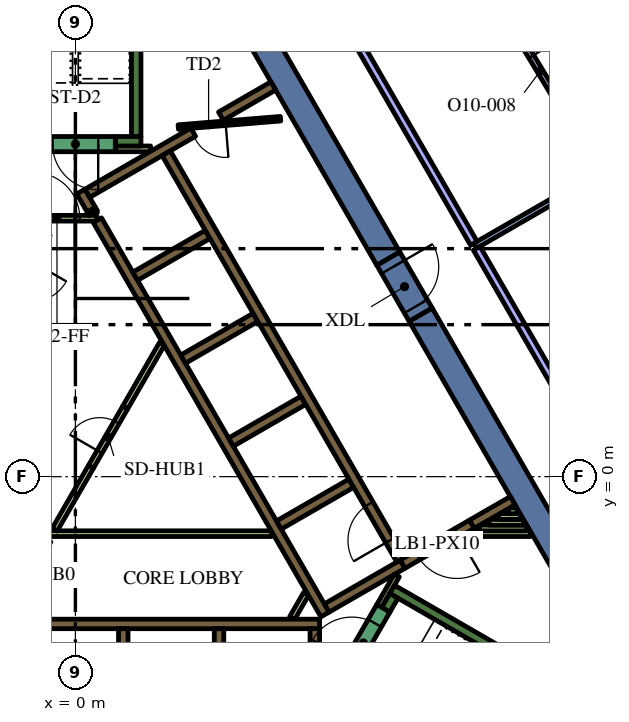
"""IFC4 building model, lengths in metres.
Left out: names, types, materials, properties, quantities, classifications, styles, units other than length and angle.
Written with IfcOpenShell. Run it as: python <this file> out.ifc"""

import sys

from ifc_helpers import new_model, si_unit, direction, frame, frame_2d, origin, place, context, subcontext, project, spatial, rectangle, extrude, element, fill, save


model = new_model("IFC4")
c1 = context("Model", 3, precision=1e-05, world=origin(), true_north=direction((0.0, 1.0)))
c2 = subcontext(c1, "Body", "Model", "MODEL_VIEW")
j1 = project(units=[si_unit("LENGTHUNIT", "METRE"), si_unit("PLANEANGLEUNIT", "RADIAN")], contexts=[c1])
p1 = place(None, origin())
s1 = spatial("IfcSite", under=j1, at=p1, CompositionType="ELEMENT")
p2 = place(p1, origin())
s2 = spatial("IfcBuilding", under=s1, at=p2, CompositionType="ELEMENT")
p3 = place(p2, frame((0.0, 0.0, 252.0)))
s3 = spatial("IfcBuildingStorey", under=s2, at=p3, CompositionType="ELEMENT", Elevation=252.0)
for number, where, z_axis, x_axis in (
    (1, (9.085, 4.264, 0.0), (0.0, 0.0, 1.0), (0.5, -0.866, 0.0)),
    (2, (8.235, 5.736, 0.0), (0.0, 0.0, 1.0), (-0.5, 0.866, 0.0)),
):
    element("IfcWall", number, at=place(p3, frame(where, z_axis=z_axis, x_axis=x_axis)), inside=s3, PredefinedType="SOLIDWALL", context=c2, shape_type="SweptSolid", body=[
        extrude(rectangle(XDim=12.472, YDim=0.7, at=frame_2d((6.236, 0.0))), origin(), (0.0, 0.0, 1.0), 4.2),
    ])
p4 = place(p3, frame((8.334, -2.964, 0.0), z_axis=(0.0, 0.0, 1.0), x_axis=(0.866016039709, -0.500016218704, 0.0)))
e3 = element("IfcWall", 3, at=p4, inside=s3, PredefinedType="SOLIDWALL", context=c2, shape_type="SweptSolid", body=[
    extrude(rectangle(XDim=7.05, YDim=0.25, at=frame_2d((3.525, 0.0))), origin(), (0.0, 0.0, 1.0), 4.2),
])
p5 = place(p3, frame((8.168, -3.503, 0.0), z_axis=(0.0, 0.0, 1.0), x_axis=(0.49972245349, 0.866185586049, 0.0)))
e4 = element("IfcWall", 4, at=p5, inside=s3, PredefinedType="SOLIDWALL", context=c2, shape_type="SweptSolid", body=[
    extrude(rectangle(XDim=0.425, YDim=0.25, at=frame_2d((0.212, 0.0))), origin(), (0.0, 0.0, 1.0), 4.2),
])
p6 = place(p3, frame((1.6, 8.95, 0.0), z_axis=(0.0, 0.0, 1.0), x_axis=(0.0, 1.0, 0.0)))
e5 = element("IfcWall", 5, at=p6, inside=s3, PredefinedType="SOLIDWALL", context=c2, shape_type="SweptSolid", body=[
    extrude(rectangle(XDim=6.8, YDim=0.25, at=frame_2d((3.4, 0.0))), origin(), (0.0, 0.0, 1.0), 4.2),
])
p7 = place(p3, frame((1.05, 8.825, 0.0), z_axis=(0.0, 0.0, 1.0), x_axis=(1.0, 0.0, 0.0)))
e6 = element("IfcWall", 6, at=p7, inside=s3, PredefinedType="SOLIDWALL", context=c2, shape_type="SweptSolid", body=[
    extrude(rectangle(XDim=0.675, YDim=0.25, at=frame_2d((0.337, 0.0))), origin(), (0.0, 0.0, 1.0), 4.2),
])
p8 = place(p3, frame((-5.545, -3.875, 0.0), z_axis=(0.0, 0.0, 1.0), x_axis=(1.0, 0.0, 0.0)))
e7 = element("IfcWall", 7, at=p8, inside=s3, PredefinedType="SOLIDWALL", context=c2, shape_type="SweptSolid", body=[
    extrude(rectangle(XDim=11.97, YDim=0.25, at=frame_2d((5.985, 0.0))), origin(), (0.0, 0.0, 1.0), 4.2),
])
p9 = place(p3, frame((6.3, -7.24, 0.0), z_axis=(0.0, 0.0, 1.0), x_axis=(0.0, 1.0, 0.0)))
e8 = element("IfcWall", 8, at=p9, inside=s3, PredefinedType="SOLIDWALL", context=c2, shape_type="SweptSolid", body=[
    extrude(rectangle(XDim=3.24, YDim=0.25, at=frame_2d((1.62, 0.0))), origin(), (0.0, 0.0, 1.0), 4.2),
])
for number, where, z_axis, x_axis in (
    (9, (3.78, -4.0, 0.0), (0.0, 0.0, 1.0), (0.0, -1.0, 0.0)),
    (10, (1.26, -4.0, 0.0), (0.0, 0.0, 1.0), (0.0, -1.0, 0.0)),
):
    element("IfcWall", number, at=place(p3, frame(where, z_axis=z_axis, x_axis=x_axis)), inside=s3, PredefinedType="SOLIDWALL", context=c2, shape_type="SweptSolid", body=[
        extrude(rectangle(XDim=2.2, YDim=0.25, at=frame_2d((1.1, 0.0))), origin(), (0.0, 0.0, 1.0), 4.2),
    ])
p10 = place(p3, frame((11.507, -0.631, 0.0), z_axis=(0.0, 0.0, 1.0), x_axis=(-0.866025525965, -0.499999788377, 0.0)))
e11 = element("IfcWall", 11, at=p10, inside=s3, PredefinedType="SOLIDWALL", context=c2, shape_type="SweptSolid", body=[
    extrude(rectangle(XDim=1.245, YDim=0.25, at=frame_2d((0.622, 0.0))), origin(), (0.0, 0.0, 1.0), 4.2),
])
p11 = place(p3, frame((0.473, 6.93, 0.0), z_axis=(0.0, 0.0, 1.0), x_axis=(-0.49972245349, 0.866185586049, 0.0)))
e12 = element("IfcWall", 12, at=p11, inside=s3, PredefinedType="SOLIDWALL", context=c2, shape_type="SweptSolid", body=[
    extrude(rectangle(XDim=0.11, YDim=0.25, at=frame_2d((0.055, 0.0))), origin(), (0.0, 0.0, 1.0), 4.2),
])
p12 = place(p3, frame((6.568, -3.627, 0.0), z_axis=(0.0, 0.0, 1.0), x_axis=(-0.499999455981, 0.866025717874, 0.0)))
e13 = element("IfcWall", 13, at=p12, inside=s3, PredefinedType="SOLIDWALL", context=c2, shape_type="SweptSolid", body=[
    extrude(rectangle(XDim=11.978, YDim=0.25, at=frame_2d((5.989, 0.0))), origin(), (0.0, 0.0, 1.0), 4.2),
])
p13 = place(p3, frame((0.417, 7.027, 0.0), z_axis=(0.0, 0.0, 1.0), x_axis=(-0.500210807569, 0.865903659763, 0.0)))
e14 = element("IfcWall", 14, at=p13, inside=s3, PredefinedType="SOLIDWALL", context=c2, shape_type="SweptSolid", body=[
    extrude(rectangle(XDim=0.548, YDim=0.25, at=frame_2d((0.274, 0.0))), origin(), (0.0, 0.0, 1.0), 4.2),
])
p14 = place(p3, frame((3.1, 9.064, 0.0), z_axis=(0.0, 0.0, 1.0), x_axis=(-0.866030133475, -0.499991807846, 0.0)))
e15 = element("IfcWall", 15, at=p14, inside=s3, PredefinedType="SOLIDWALL", context=c2, shape_type="SweptSolid", body=[
    extrude(rectangle(XDim=3.217, YDim=0.25, at=frame_2d((1.608, 0.0))), origin(), (0.0, 0.0, 1.0), 4.2),
])
p15 = place(p3, frame((1.574, 5.274, 0.0), z_axis=(0.0, 0.0, 1.0), x_axis=(0.866028486751, 0.499994660107, 0.0)))
e16 = element("IfcWall", 16, at=p15, inside=s3, PredefinedType="SOLIDWALL", context=c2, shape_type="SweptSolid", body=[
    extrude(rectangle(XDim=2.2, YDim=0.25, at=frame_2d((1.1, 0.0))), origin(), (0.0, 0.0, 1.0), 4.2),
])
for number, where, z_axis, x_axis in (
    (17, (2.834, 3.091, 0.0), (0.0, 0.0, 1.0), (0.866, 0.5, 0.0)),
    (18, (4.094, 0.909, 0.0), (0.0, 0.0, 1.0), (0.866, 0.5, 0.0)),
    (19, (5.354, -1.274, 0.0), (0.0, 0.0, 1.0), (0.866, 0.5, 0.0)),
):
    element("IfcWall", number, at=place(p3, frame(where, z_axis=z_axis, x_axis=x_axis)), inside=s3, PredefinedType="SOLIDWALL", context=c2, shape_type="SweptSolid", body=[
        extrude(rectangle(XDim=2.2, YDim=0.25, at=frame_2d((1.1, 0.0))), origin(), (0.0, 0.0, 1.0), 4.2),
    ])
p16 = place(p3, frame((6.614, -3.456, 0.0), z_axis=(0.0, 0.0, 1.0), x_axis=(0.866025089694, 0.500000544019, 0.0)))
e20 = element("IfcWall", 20, at=p16, inside=s3, PredefinedType="SOLIDWALL", context=c2, shape_type="SweptSolid", body=[
    extrude(rectangle(XDim=2.305, YDim=0.25, at=frame_2d((1.153, 0.0))), origin(), (0.0, 0.0, 1.0), 4.2),
])
p17 = place(p3, frame((3.83, 9.486, 0.0), z_axis=(0.0, 0.0, 1.0), x_axis=(0.865986202621, 0.500067892261, 0.0)))
e21 = element("IfcWall", 21, at=p17, inside=s3, PredefinedType="SOLIDWALL", context=c2, shape_type="SweptSolid", body=[
    extrude(rectangle(XDim=1.591, YDim=0.25, at=frame_2d((0.795, 0.0))), origin(), (0.0, 0.0, 1.0), 4.2),
])
p18 = place(p3, frame((1.05, 8.625, 0.0), z_axis=(0.0, 0.0, 1.0), x_axis=(1.0, 0.0, 0.0)))
e22 = element("IfcWall", 22, at=p18, inside=s3, PredefinedType="PARTITIONING", context=c2, shape_type="SweptSolid", body=[
    extrude(rectangle(XDim=0.929, YDim=0.15, at=frame_2d((0.464, 0.0))), origin(), (0.0, 0.0, 1.0), 3.4),
])
p19 = place(p3, frame((10.362, -1.5, 0.0), z_axis=(0.0, 0.0, 1.0), x_axis=(1.0, 0.0, 0.0)))
e23 = element("IfcWall", 23, at=p19, inside=s3, PredefinedType="PARTITIONING", context=c2, shape_type="SweptSolid", body=[
    extrude(rectangle(XDim=1.61, YDim=0.15, at=frame_2d((0.805, 0.0))), origin(), (0.0, 0.0, 1.0), 3.4),
])
p20 = place(p3, frame((10.622, -1.35, 0.0), z_axis=(0.0, 0.0, 1.0), x_axis=(1.0, 0.0, 0.0)))
e24 = element("IfcWall", 24, at=p20, inside=s3, PredefinedType="PARTITIONING", context=c2, shape_type="SweptSolid", body=[
    extrude(rectangle(XDim=1.263, YDim=0.15, at=frame_2d((0.632, 0.0))), origin(), (0.0, 0.0, 1.0), 3.4),
])
p21 = place(p3, frame((10.882, -1.2, 0.0), z_axis=(0.0, 0.0, 1.0), x_axis=(1.0, 0.0, 0.0)))
e25 = element("IfcWall", 25, at=p21, inside=s3, PredefinedType="PARTITIONING", context=c2, shape_type="SweptSolid", body=[
    extrude(rectangle(XDim=0.917, YDim=0.15, at=frame_2d((0.459, 0.0))), origin(), (0.0, 0.0, 1.0), 3.4),
])
p22 = place(p3, frame((11.712, -1.05, 0.0), z_axis=(0.0, 0.0, 1.0), x_axis=(-1.0, 0.0, 0.0)))
e26 = element("IfcWall", 26, at=p22, inside=s3, PredefinedType="PARTITIONING", context=c2, shape_type="SweptSolid", body=[
    extrude(rectangle(XDim=0.571, YDim=0.15, at=frame_2d((0.285, 0.0))), origin(), (0.0, 0.0, 1.0), 3.4),
])
p23 = place(p3, frame((11.401, -0.9, 0.0), z_axis=(0.0, 0.0, 1.0), x_axis=(1.0, 0.0, 0.0)))
e27 = element("IfcWall", 27, at=p23, inside=s3, PredefinedType="PARTITIONING", context=c2, shape_type="SweptSolid", body=[
    extrude(rectangle(XDim=0.224, YDim=0.15, at=frame_2d((0.112, 0.0))), origin(), (0.0, 0.0, 1.0), 3.4),
])
p24 = place(p3, frame((8.459, -2.599, 0.0), z_axis=(0.0, 0.0, 1.0), x_axis=(-0.500041054325, -0.866001699761, 0.0)))
e28 = element("IfcWall", 28, at=p24, inside=s3, PredefinedType="PARTITIONING", context=c2, shape_type="SweptSolid", body=[
    extrude(rectangle(XDim=0.929, YDim=0.15, at=frame_2d((0.464, 0.0))), origin(), (0.0, 0.0, 1.0), 4.2),
])
p25 = place(p3, frame((5.705, -3.718, 0.0), z_axis=(0.0, 0.0, 1.0), x_axis=(0.499962090823, 0.866047289552, 0.0)))
e29 = element("IfcWall", 29, at=p25, inside=s3, PredefinedType="PARTITIONING", context=c2, shape_type="SweptSolid", body=[
    extrude(rectangle(XDim=0.735, YDim=0.15, at=frame_2d((0.367, 0.0))), origin(), (0.0, 0.0, 1.0), 3.4),
])
p26 = place(p3, frame((-4.2, -1.5, 0.0), z_axis=(0.0, 0.0, 1.0), x_axis=(1.0, 0.0, 0.0)))
e30 = element("IfcWall", 30, at=p26, inside=s3, PredefinedType="PARTITIONING", context=c2, shape_type="SweptSolid", body=[
    extrude(rectangle(XDim=9.359, YDim=0.15, at=frame_2d((4.68, 0.0))), origin(), (0.0, 0.0, 1.0), 3.4),
])
p27 = place(p3, frame((-0.544, -1.393, 0.0), z_axis=(0.0, 0.0, 1.0), x_axis=(0.499928740635, 0.866066541489, 0.0)))
e31 = element("IfcWall", 31, at=p27, inside=s3, PredefinedType="PARTITIONING", context=c2, shape_type="SweptSolid", body=[
    extrude(rectangle(XDim=1.912, YDim=0.15, at=frame_2d((0.956, 0.0))), origin(), (0.0, 0.0, 1.0), 3.4),
])
p28 = place(p3, frame((1.312, 1.822, 0.0), z_axis=(0.0, 0.0, 1.0), x_axis=(0.500003549559, 0.866023354436, 0.0)))
e32 = element("IfcWall", 32, at=p28, inside=s3, PredefinedType="PARTITIONING", context=c2, shape_type="SweptSolid", body=[
    extrude(rectangle(XDim=1.93, YDim=0.15, at=frame_2d((0.965, 0.0))), origin(), (0.0, 0.0, 1.0), 3.4),
])
p29 = place(p3, frame((8.565, -2.185, 0.0), z_axis=(0.0, 0.0, 1.0), x_axis=(-0.499997954832, 0.866026584559, 0.0)))
e33 = element("IfcWall", 33, at=p29, inside=s3, PredefinedType="SOLIDWALL", context=c2, shape_type="SweptSolid", body=[
    extrude(rectangle(XDim=12.35, YDim=0.25, at=frame_2d((6.175, 0.0))), origin(), (0.0, 0.0, 1.0), 4.2),
])
p30 = place(p29, frame((0.585, 0.0, 0.0)))
e34 = element("IfcOpeningElement", 34, at=p30, cuts=e33, PredefinedType="OPENING", context=c2, shape_type="SweptSolid", body=[
    extrude(rectangle(XDim=1.1, YDim=2.1, at=frame_2d((0.55, 1.05))), frame((0.0, 0.135, 0.0), z_axis=(0.0, -1.0, 0.0), x_axis=(1.0, 0.0, 0.0)), (0.0, 0.0, 1.0), 0.27),
])
p31 = place(p3, frame((7.053, -5.284, 0.0), z_axis=(0.0, 0.0, 1.0), x_axis=(0.500078061341, 0.865980330357, 0.0)))
e35 = element("IfcWall", 35, at=p31, inside=s3, PredefinedType="SOLIDWALL", context=c2, shape_type="SweptSolid", body=[
    extrude(rectangle(XDim=2.1, YDim=0.4, at=frame_2d((1.05, 0.0))), origin(), (0.0, 0.0, 1.0), 4.2),
])
p32 = place(p31, frame((0.45, 0.0, 0.0)))
e36 = element("IfcOpeningElement", 36, at=p32, cuts=e35, PredefinedType="OPENING", context=c2, shape_type="SweptSolid", body=[
    extrude(rectangle(XDim=1.2, YDim=2.1, at=frame_2d((0.6, 1.05))), frame((0.0, 0.21, 0.0), z_axis=(0.0, -1.0, 0.0), x_axis=(1.0, 0.0, 0.0)), (0.0, 0.0, 1.0), 0.42),
])
p33 = place(p3, frame((1.05, 8.75, 0.0), z_axis=(0.0, 0.0, 1.0), x_axis=(-1.0, 0.0, 0.0)))
e37 = element("IfcWall", 37, at=p33, inside=s3, PredefinedType="SOLIDWALL", context=c2, shape_type="SweptSolid", body=[
    extrude(rectangle(XDim=2.1, YDim=0.4, at=frame_2d((1.05, 0.0))), origin(), (0.0, 0.0, 1.0), 4.2),
])
p34 = place(p33, frame((0.45, 0.0, 0.0)))
e38 = element("IfcOpeningElement", 38, at=p34, cuts=e37, PredefinedType="OPENING", context=c2, shape_type="SweptSolid", body=[
    extrude(rectangle(XDim=1.2, YDim=2.1, at=frame_2d((0.6, 1.05))), frame((0.0, 0.21, 0.0), z_axis=(0.0, -1.0, 0.0), x_axis=(1.0, 0.0, 0.0)), (0.0, 0.0, 1.0), 0.42),
])
p35 = place(p3, frame((5.398, 9.419, 0.0), z_axis=(0.0, 0.0, 1.0), x_axis=(-0.996653416376, -0.081743303248, 0.0)))
e39 = element("IfcWall", 39, at=p35, inside=s3, PredefinedType="PARTITIONING", context=c2, shape_type="SweptSolid", body=[
    extrude(rectangle(XDim=2.7, YDim=0.12, at=frame_2d((1.35, 0.0))), origin(), (0.0, 0.0, 1.0), 3.4),
])
p36 = place(p35, frame((1.45, 0.0, 0.0)))
e40 = element("IfcOpeningElement", 40, at=p36, cuts=e39, PredefinedType="OPENING", context=c2, shape_type="SweptSolid", body=[
    extrude(rectangle(XDim=0.9, YDim=2.1, at=frame_2d((0.45, 1.05))), frame((0.0, 0.07, 0.0), z_axis=(0.0, -1.0, 0.0), x_axis=(1.0, 0.0, 0.0)), (0.0, 0.0, 1.0), 0.14),
])
p37 = place(p3, frame((-1.534, 6.8, 0.0), z_axis=(0.0, 0.0, 1.0), x_axis=(1.0, 0.0, 0.0)))
e41 = element("IfcWall", 41, at=p37, inside=s3, PredefinedType="PARTITIONING", context=c2, shape_type="SweptSolid", body=[
    extrude(rectangle(XDim=2.1, YDim=0.15, at=frame_2d((1.05, 0.0))), origin(), (0.0, 0.0, 1.0), 3.4),
])
p38 = place(p37, frame((0.45, 0.0, 0.0)))
e42 = element("IfcOpeningElement", 42, at=p38, cuts=e41, PredefinedType="OPENING", context=c2, shape_type="SweptSolid", body=[
    extrude(rectangle(XDim=1.2, YDim=2.1, at=frame_2d((0.6, 1.05))), frame((0.0, 0.085, 0.0), z_axis=(0.0, -1.0, 0.0), x_axis=(1.0, 0.0, 0.0)), (0.0, 0.0, 1.0), 0.17),
])
p39 = place(p3, frame((10.429, -1.253, 0.0), z_axis=(0.0, 0.0, 1.0), x_axis=(-0.866009402589, -0.500027713859, 0.0)))
e43 = element("IfcWall", 43, at=p39, inside=s3, PredefinedType="SOLIDWALL", context=c2, shape_type="SweptSolid", body=[
    extrude(rectangle(XDim=2.1, YDim=0.25, at=frame_2d((1.05, 0.0))), origin(), (0.0, 0.0, 1.0), 4.2),
])
p40 = place(p39, frame((0.45, 0.0, 0.0)))
e44 = element("IfcOpeningElement", 44, at=p40, cuts=e43, PredefinedType="OPENING", context=c2, shape_type="SweptSolid", body=[
    extrude(rectangle(XDim=1.2, YDim=2.1, at=frame_2d((0.6, 1.05))), frame((0.0, 0.135, 0.0), z_axis=(0.0, -1.0, 0.0), x_axis=(1.0, 0.0, 0.0)), (0.0, 0.0, 1.0), 0.27),
])
p41 = place(p3, frame((8.235, 5.736, 0.0), z_axis=(0.0, 0.0, 1.0), x_axis=(0.499954529098, -0.86605165483, 0.0)))
e45 = element("IfcWall", 45, at=p41, inside=s3, PredefinedType="SOLIDWALL", context=c2, shape_type="SweptSolid", body=[
    extrude(rectangle(XDim=1.7, YDim=0.7, at=frame_2d((0.85, 0.0))), origin(), (0.0, 0.0, 1.0), 4.2),
])
p42 = place(p41, frame((0.25, 0.0, 0.0)))
e46 = element("IfcOpeningElement", 46, at=p42, cuts=e45, PredefinedType="OPENING", context=c2, shape_type="SweptSolid", body=[
    extrude(rectangle(XDim=1.2, YDim=2.1, at=frame_2d((0.6, 1.05))), frame((0.0, 0.36, 0.0), z_axis=(0.0, -1.0, 0.0), x_axis=(1.0, 0.0, 0.0)), (0.0, 0.0, 1.0), 0.72),
])
p43 = place(p3, frame((0.412, 0.263, 0.0), z_axis=(0.0, 0.0, 1.0), x_axis=(0.500062916607, 0.865989075817, 0.0)))
e47 = element("IfcWall", 47, at=p43, inside=s3, PredefinedType="PARTITIONING", context=c2, shape_type="SweptSolid", body=[
    extrude(rectangle(XDim=1.8, YDim=0.15, at=frame_2d((0.9, 0.0))), origin(), (0.0, 0.0, 1.0), 3.4),
])
p44 = place(p43, frame((0.45, 0.0, 0.0)))
e48 = element("IfcOpeningElement", 48, at=p44, cuts=e47, PredefinedType="OPENING", context=c2, shape_type="SweptSolid", body=[
    extrude(rectangle(XDim=0.9, YDim=2.1, at=frame_2d((0.45, 1.05))), frame((0.0, 0.085, 0.0), z_axis=(0.0, -1.0, 0.0), x_axis=(1.0, 0.0, 0.0)), (0.0, 0.0, 1.0), 0.17),
])
p45 = place(p3, frame((10.522, 6.075, 0.0), z_axis=(0.0, 0.0, 1.0), x_axis=(0.866002601515, 0.500039492609, 0.0)))
e49 = element("IfcWall", 49, at=p45, inside=s3, PredefinedType="PARTITIONING", context=c2, shape_type="SweptSolid", body=[
    extrude(rectangle(XDim=3.844, YDim=0.15, at=frame_2d((1.922, 0.0))), origin(), (0.0, 0.0, 1.0), 3.4),
])
p46 = place(p3, frame((13.522, 0.879, 0.0), z_axis=(0.0, 0.0, 1.0), x_axis=(-0.499994727438, 0.866028447878, 0.0)))
e50 = element("IfcWall", 50, at=p46, inside=s3, PredefinedType="PARTITIONING", context=c2, shape_type="SweptSolid", body=[
    extrude(rectangle(XDim=5.925, YDim=0.2, at=frame_2d((2.962, 0.0))), origin(), (0.0, 0.0, 1.0), 3.4),
])
p47 = place(p3, frame((10.607, 13.347, 0.0), z_axis=(0.0, 0.0, 1.0), x_axis=(0.517871895574, -0.855458181196, 0.0)))
e51 = element("IfcWall", 51, at=p47, inside=s3, PredefinedType="PARTITIONING", context=c2, shape_type="SweptSolid", body=[
    extrude(rectangle(XDim=6.182, YDim=0.15, at=frame_2d((3.091, 0.0))), origin(), (0.0, 0.0, 1.0), 3.4),
])
p48 = place(p47, frame((2.682, 0.0, 0.0)))
e52 = element("IfcOpeningElement", 52, at=p48, cuts=e51, PredefinedType="OPENING", context=c2, shape_type="SweptSolid", body=[
    extrude(rectangle(XDim=0.9, YDim=2.1, at=frame_2d((0.45, 1.05))), frame((0.0, 0.085, 0.0), z_axis=(0.0, -1.0, 0.0), x_axis=(1.0, 0.0, 0.0)), (0.0, 0.0, 1.0), 0.17),
])
p49 = place(p3, frame((10.485, 6.14, 0.0), z_axis=(0.0, 0.0, 1.0), x_axis=(-0.499976885332, 0.866038748633, 0.0)))
e53 = element("IfcWall", 53, at=p49, inside=s3, PredefinedType="PARTITIONING", context=c2, shape_type="SweptSolid", body=[
    extrude(rectangle(XDim=5.925, YDim=0.2, at=frame_2d((2.962, 0.0))), origin(), (0.0, 0.0, 1.0), 3.4),
])
p50 = place(p30, origin())
e54 = element("IfcDoor", 54, at=p50, inside=s3, OperationType="DOUBLE_DOOR_SLIDING", PredefinedType="DOOR", context=c2, shape_type="SweptSolid", body=[
    extrude(rectangle(XDim=1.1, YDim=2.1, at=frame_2d((0.55, 1.05))), frame((0.0, 0.025, 0.0), z_axis=(0.0, -1.0, 0.0), x_axis=(1.0, 0.0, 0.0)), (0.0, 0.0, 1.0), 0.05),
])
fill(e34, e54)
p51 = place(p32, origin())
e55 = element("IfcDoor", 55, at=p51, inside=s3, OperationType="SINGLE_SWING_LEFT", PredefinedType="DOOR", context=c2, shape_type="SweptSolid", body=[
    extrude(rectangle(XDim=1.2, YDim=2.1, at=frame_2d((0.6, 1.05))), frame((0.0, 0.025, 0.0), z_axis=(0.0, -1.0, 0.0), x_axis=(1.0, 0.0, 0.0)), (0.0, 0.0, 1.0), 0.05),
])
fill(e36, e55)
p52 = place(p34, origin())
e56 = element("IfcDoor", 56, at=p52, inside=s3, OperationType="SINGLE_SWING_LEFT", PredefinedType="DOOR", context=c2, shape_type="SweptSolid", body=[
    extrude(rectangle(XDim=1.2, YDim=2.1, at=frame_2d((0.6, 1.05))), frame((0.0, 0.025, 0.0), z_axis=(0.0, -1.0, 0.0), x_axis=(1.0, 0.0, 0.0)), (0.0, 0.0, 1.0), 0.05),
])
fill(e38, e56)
p53 = place(p36, origin())
e57 = element("IfcDoor", 57, at=p53, inside=s3, OperationType="SINGLE_SWING_LEFT", PredefinedType="DOOR", context=c2, shape_type="SweptSolid", body=[
    extrude(rectangle(XDim=0.9, YDim=2.1, at=frame_2d((0.45, 1.05))), frame((0.0, 0.025, 0.0), z_axis=(0.0, -1.0, 0.0), x_axis=(1.0, 0.0, 0.0)), (0.0, 0.0, 1.0), 0.05),
])
fill(e40, e57)
p54 = place(p38, origin())
e58 = element("IfcDoor", 58, at=p54, inside=s3, OperationType="SINGLE_SWING_LEFT", PredefinedType="DOOR", context=c2, shape_type="SweptSolid", body=[
    extrude(rectangle(XDim=1.2, YDim=2.1, at=frame_2d((0.6, 1.05))), frame((0.0, 0.025, 0.0), z_axis=(0.0, -1.0, 0.0), x_axis=(1.0, 0.0, 0.0)), (0.0, 0.0, 1.0), 0.05),
])
fill(e42, e58)
p55 = place(p40, origin())
e59 = element("IfcDoor", 59, at=p55, inside=s3, OperationType="SINGLE_SWING_LEFT", PredefinedType="DOOR", context=c2, shape_type="SweptSolid", body=[
    extrude(rectangle(XDim=1.2, YDim=2.1, at=frame_2d((0.6, 1.05))), frame((0.0, 0.025, 0.0), z_axis=(0.0, -1.0, 0.0), x_axis=(1.0, 0.0, 0.0)), (0.0, 0.0, 1.0), 0.05),
])
fill(e44, e59)
p56 = place(p42, origin())
e60 = element("IfcDoor", 60, at=p56, inside=s3, OperationType="SINGLE_SWING_LEFT", PredefinedType="DOOR", context=c2, shape_type="SweptSolid", body=[
    extrude(rectangle(XDim=1.2, YDim=2.1, at=frame_2d((0.6, 1.05))), frame((0.0, 0.025, 0.0), z_axis=(0.0, -1.0, 0.0), x_axis=(1.0, 0.0, 0.0)), (0.0, 0.0, 1.0), 0.05),
])
fill(e46, e60)
p57 = place(p44, origin())
e61 = element("IfcDoor", 61, at=p57, inside=s3, OperationType="SINGLE_SWING_LEFT", PredefinedType="DOOR", context=c2, shape_type="SweptSolid", body=[
    extrude(rectangle(XDim=0.9, YDim=2.1, at=frame_2d((0.45, 1.05))), frame((0.0, 0.025, 0.0), z_axis=(0.0, -1.0, 0.0), x_axis=(1.0, 0.0, 0.0)), (0.0, 0.0, 1.0), 0.05),
])
fill(e48, e61)
p58 = place(p48, origin())
e62 = element("IfcDoor", 62, at=p58, inside=s3, OperationType="SINGLE_SWING_RIGHT", PredefinedType="DOOR", context=c2, shape_type="SweptSolid", body=[
    extrude(rectangle(XDim=0.9, YDim=2.1, at=frame_2d((0.45, 1.05))), frame((0.0, 0.025, 0.0), z_axis=(0.0, -1.0, 0.0), x_axis=(1.0, 0.0, 0.0)), (0.0, 0.0, 1.0), 0.05),
])
fill(e52, e62)
save(model, sys.argv[1])
